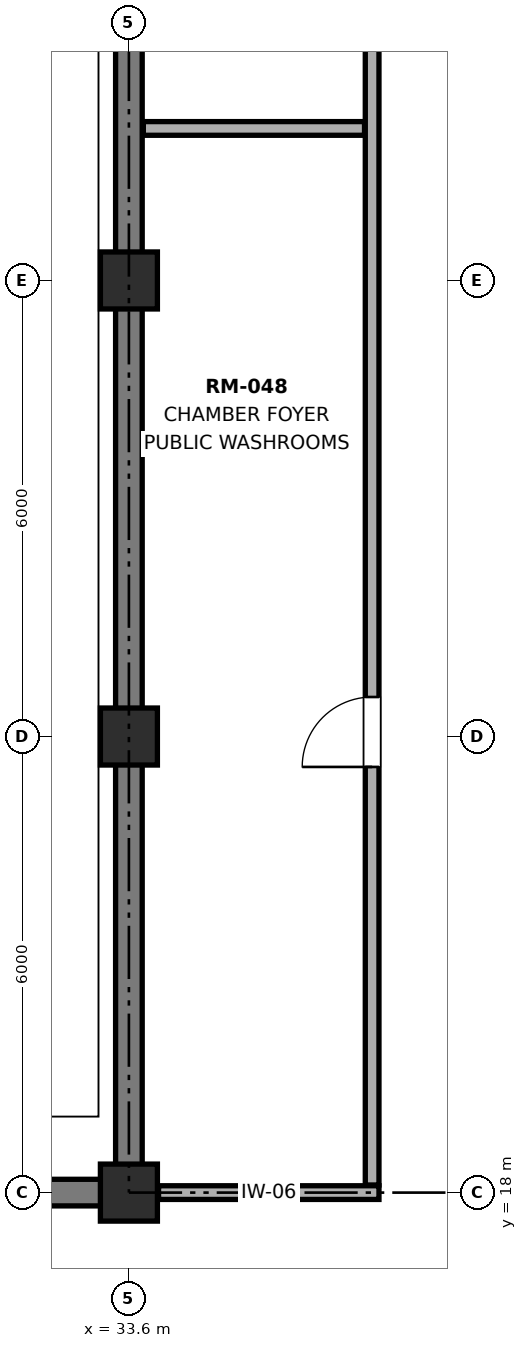
"""IFC4 building model, lengths in metres.
Left out: names, types, materials, properties, quantities, classifications, styles, units other than length and angle.
Written with IfcOpenShell. Run it as: python <this file> out.ifc"""

import sys

from ifc_helpers import new_model, si_unit, direction, frame, frame_2d, origin, origin_2d, place, context, subcontext, project, spatial, rectangle, extrude, element, fill, save


model = new_model("IFC4")
c1 = context("Model", 3, precision=1e-05, world=origin(), true_north=direction((0.0, 1.0)))
c2 = subcontext(c1, "Body", "Model", "MODEL_VIEW")
j1 = project(units=[si_unit("LENGTHUNIT", "METRE"), si_unit("PLANEANGLEUNIT", "RADIAN")], contexts=[c1])
p1 = place(None, origin())
s1 = spatial("IfcSite", under=j1, at=p1, CompositionType="ELEMENT")
p2 = place(p1, origin())
s2 = spatial("IfcBuilding", under=s1, at=p2, CompositionType="ELEMENT")
p3 = place(p2, origin())
s3 = spatial("IfcBuildingStorey", under=s2, at=p3, CompositionType="ELEMENT", Elevation=0.0)
for number, where, z_axis, x_axis in (
    (1, (33.6, 18.0, 0.0), (0.0, 0.0, 1.0), (1.0, 0.0, 0.0)),
    (2, (33.6, 24.0, 0.0), (0.0, 0.0, 1.0), (1.0, 0.0, 0.0)),
    (3, (33.6, 30.0, 0.0), (0.0, 0.0, 1.0), (1.0, 0.0, 0.0)),
):
    element("IfcColumn", number, at=place(p3, frame(where, z_axis=z_axis, x_axis=x_axis)), inside=s3, PredefinedType="COLUMN", context=c2, shape_type="SweptSolid", body=[
        extrude(rectangle(XDim=0.75, YDim=0.75, at=origin_2d()), origin(), (0.0, 0.0, 1.0), 5.4),
    ])
p4 = place(p3, frame((8.225, 18.0, 0.0), z_axis=(0.0, 0.0, 1.0), x_axis=(1.0, 0.0, 0.0)))
e4 = element("IfcWall", 4, at=p4, inside=s3, PredefinedType="SHEAR", context=c2, shape_type="SweptSolid", body=[
    extrude(rectangle(XDim=25.55, YDim=0.35, at=frame_2d((12.775, 0.0))), origin(), (0.0, 0.0, 1.0), 5.4),
])
p5 = place(p4, frame((20.0, 0.0, 0.0)))
e5 = element("IfcOpeningElement", 5, at=p5, cuts=e4, PredefinedType="OPENING", context=c2, shape_type="SweptSolid", body=[
    extrude(rectangle(XDim=2.0, YDim=2.45, at=frame_2d((1.0, 1.225))), frame((0.0, 0.185, 0.0), z_axis=(0.0, -1.0, 0.0), x_axis=(1.0, 0.0, 0.0)), (0.0, 0.0, 1.0), 0.37),
])
p6 = place(p3, frame((33.6, 18.175, 0.0), z_axis=(0.0, 0.0, 1.0), x_axis=(0.0, 1.0, 0.0)))
e6 = element("IfcWall", 6, at=p6, inside=s3, PredefinedType="SHEAR", context=c2, shape_type="SweptSolid", body=[
    extrude(rectangle(XDim=20.05, YDim=0.35, at=frame_2d((10.025, 0.0))), origin(), (0.0, 0.0, 1.0), 5.4),
])
p7 = place(p3, frame((33.99, 18.0, 0.0), z_axis=(0.0, 0.0, 1.0), x_axis=(1.0, 0.0, 0.0)))
e7 = element("IfcWall", 7, at=p7, inside=s3, PredefinedType="PARTITIONING", context=c2, shape_type="SweptSolid", body=[
    extrude(rectangle(XDim=2.9, YDim=0.18, at=frame_2d((1.45, 0.0))), origin(), (0.0, 0.0, 1.0), 4.35),
])
p8 = place(p3, frame((33.79, 32.0, 0.0), z_axis=(0.0, 0.0, 1.0), x_axis=(1.0, 0.0, 0.0)))
e8 = element("IfcWall", 8, at=p8, inside=s3, PredefinedType="PARTITIONING", context=c2, shape_type="SweptSolid", body=[
    extrude(rectangle(XDim=2.91, YDim=0.18, at=frame_2d((1.455, 0.0))), origin(), (0.0, 0.0, 1.0), 5.09),
])
p9 = place(p3, frame((36.8, 18.1, 0.0), z_axis=(0.0, 0.0, 1.0), x_axis=(0.0, 1.0, 0.0)))
e9 = element("IfcWall", 9, at=p9, inside=s3, PredefinedType="PARTITIONING", context=c2, shape_type="SweptSolid", body=[
    extrude(rectangle(XDim=20.2, YDim=0.18, at=frame_2d((10.1, 0.0))), origin(), (0.0, 0.0, 1.0), 5.09),
])
p10 = place(p9, frame((5.5, 0.0, 0.0)))
e10 = element("IfcOpeningElement", 10, at=p10, cuts=e9, PredefinedType="OPENING", context=c2, shape_type="SweptSolid", body=[
    extrude(rectangle(XDim=0.92, YDim=2.15, at=frame_2d((0.46, 1.075))), frame((0.0, 0.1, 0.0), z_axis=(0.0, -1.0, 0.0), x_axis=(1.0, 0.0, 0.0)), (0.0, 0.0, 1.0), 0.2),
])
p11 = place(p9, frame((15.5, 0.0, 0.0)))
e11 = element("IfcOpeningElement", 11, at=p11, cuts=e9, PredefinedType="OPENING", context=c2, shape_type="SweptSolid", body=[
    extrude(rectangle(XDim=0.92, YDim=2.15, at=frame_2d((0.46, 1.075))), frame((0.0, 0.1, 0.0), z_axis=(0.0, -1.0, 0.0), x_axis=(1.0, 0.0, 0.0)), (0.0, 0.0, 1.0), 0.2),
])
p12 = place(p10, origin())
e12 = element("IfcDoor", 12, at=p12, inside=s3, OperationType="SINGLE_SWING_LEFT", PredefinedType="DOOR", context=c2, shape_type="SweptSolid", body=[
    extrude(rectangle(XDim=0.92, YDim=2.15, at=frame_2d((0.46, 1.075))), frame((0.0, 0.025, 0.0), z_axis=(0.0, -1.0, 0.0), x_axis=(1.0, 0.0, 0.0)), (0.0, 0.0, 1.0), 0.05),
])
fill(e10, e12)
save(model, sys.argv[1])
